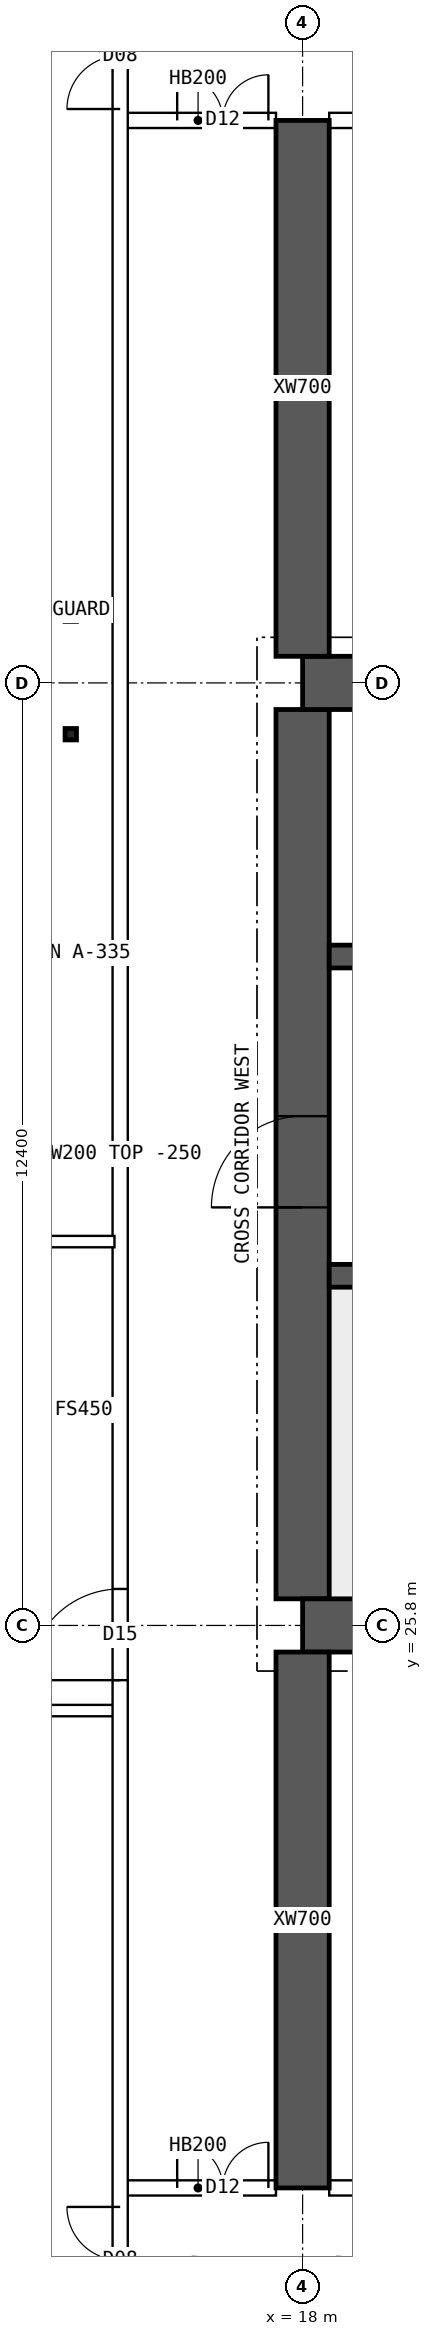
"""IFC4 building model, lengths in metres.
Left out: names, types, materials, properties, quantities, classifications, styles, units other than length and angle.
Written with IfcOpenShell. Run it as: python <this file> out.ifc"""

import sys

from ifc_helpers import new_model, si_unit, direction, frame, frame_2d, origin, origin_2d, place, context, subcontext, project, spatial, polyline, rectangle, hollow_rectangle, outline, extrude, element, fill, save


model = new_model("IFC4")
c1 = context("Model", 3, precision=1e-05, world=origin(), true_north=direction((0.0, 1.0)))
c2 = subcontext(c1, "Body", "Model", "MODEL_VIEW")
j1 = project(units=[si_unit("LENGTHUNIT", "METRE"), si_unit("PLANEANGLEUNIT", "RADIAN")], contexts=[c1])
p1 = place(None, origin())
s1 = spatial("IfcSite", under=j1, at=p1, CompositionType="ELEMENT")
p2 = place(p1, origin())
s2 = spatial("IfcBuilding", under=s1, at=p2, CompositionType="ELEMENT")
p3 = place(p2, frame((0.0, 0.0, 216.55)))
s3 = spatial("IfcBuildingStorey", under=s2, at=p3, CompositionType="ELEMENT", Elevation=216.55)
for number, where, z_axis, x_axis in (
    (1, (18.0, 25.8, 0.0), (0.0, 0.0, 1.0), (1.0, 0.0, 0.0)),
    (2, (18.0, 38.2, 0.0), (0.0, 0.0, 1.0), (1.0, 0.0, 0.0)),
):
    element("IfcWall", number, at=place(p3, frame(where, z_axis=z_axis, x_axis=x_axis)), inside=s3, PredefinedType="SHEAR", context=c2, shape_type="SweptSolid", body=[
        extrude(rectangle(XDim=48.0, YDim=0.7, at=frame_2d((24.0, 0.0))), origin(), (0.0, 0.0, 1.0), 3.75),
    ])
p4 = place(p3, frame((18.0, 26.15, 0.0), z_axis=(0.0, 0.0, 1.0), x_axis=(0.0, 1.0, 0.0)))
e3 = element("IfcWall", 3, at=p4, inside=s3, PredefinedType="SHEAR", context=c2, shape_type="SweptSolid", body=[
    extrude(rectangle(XDim=11.7, YDim=0.7, at=frame_2d((5.85, 0.0))), origin(), (0.0, 0.0, 1.0), 3.75),
])
p5 = place(p4, frame((5.15, 0.0, 0.0)))
e4 = element("IfcOpeningElement", 4, at=p5, cuts=e3, PredefinedType="OPENING", context=c2, shape_type="SweptSolid", body=[
    extrude(rectangle(XDim=1.2, YDim=2.1, at=frame_2d((0.6, 1.05))), frame((0.0, 0.36, 0.0), z_axis=(0.0, -1.0, 0.0), x_axis=(1.0, 0.0, 0.0)), (0.0, 0.0, 1.0), 0.72),
])
p6 = place(p3, frame((18.35, 30.4, 0.0), z_axis=(0.0, 0.0, 1.0), x_axis=(1.0, 0.0, 0.0)))
e5 = element("IfcWall", 5, at=p6, inside=s3, PredefinedType="SHEAR", context=c2, shape_type="SweptSolid", body=[
    extrude(rectangle(XDim=47.3, YDim=0.3, at=frame_2d((23.65, 0.0))), origin(), (0.0, 0.0, 1.0), 3.75),
])
p7 = place(p6, frame((0.4, 0.0, 0.0)))
e6 = element("IfcOpeningElement", 6, at=p7, cuts=e5, PredefinedType="OPENING", context=c2, shape_type="SweptSolid", body=[
    extrude(rectangle(XDim=1.0, YDim=2.1, at=frame_2d((0.5, 1.05))), frame((0.0, 0.16, 0.0), z_axis=(0.0, -1.0, 0.0), x_axis=(1.0, 0.0, 0.0)), (0.0, 0.0, 1.0), 0.32),
])
p8 = place(p6, frame((45.9, 0.0, 0.0)))
e7 = element("IfcOpeningElement", 7, at=p8, cuts=e5, PredefinedType="OPENING", context=c2, shape_type="SweptSolid", body=[
    extrude(rectangle(XDim=1.0, YDim=2.1, at=frame_2d((0.5, 1.05))), frame((0.0, 0.16, 0.0), z_axis=(0.0, -1.0, 0.0), x_axis=(1.0, 0.0, 0.0)), (0.0, 0.0, 1.0), 0.32),
])
p9 = place(p6, frame((8.4, 0.0, 0.0)))
e8 = element("IfcOpeningElement", 8, at=p9, cuts=e5, PredefinedType="OPENING", context=c2, shape_type="SweptSolid", body=[
    extrude(rectangle(XDim=1.1, YDim=2.1, at=frame_2d((0.55, 1.05))), frame((0.0, 0.16, 0.0), z_axis=(0.0, -1.0, 0.0), x_axis=(1.0, 0.0, 0.0)), (0.0, 0.0, 1.0), 0.32),
])
p10 = place(p6, frame((11.0, 0.0, 0.0)))
e9 = element("IfcOpeningElement", 9, at=p10, cuts=e5, PredefinedType="OPENING", context=c2, shape_type="SweptSolid", body=[
    extrude(rectangle(XDim=1.1, YDim=2.1, at=frame_2d((0.55, 1.05))), frame((0.0, 0.16, 0.0), z_axis=(0.0, -1.0, 0.0), x_axis=(1.0, 0.0, 0.0)), (0.0, 0.0, 1.0), 0.32),
])
p11 = place(p6, frame((13.6, 0.0, 0.0)))
e10 = element("IfcOpeningElement", 10, at=p11, cuts=e5, PredefinedType="OPENING", context=c2, shape_type="SweptSolid", body=[
    extrude(rectangle(XDim=1.1, YDim=2.1, at=frame_2d((0.55, 1.05))), frame((0.0, 0.16, 0.0), z_axis=(0.0, -1.0, 0.0), x_axis=(1.0, 0.0, 0.0)), (0.0, 0.0, 1.0), 0.32),
])
p12 = place(p6, frame((16.2, 0.0, 0.0)))
e11 = element("IfcOpeningElement", 11, at=p12, cuts=e5, PredefinedType="OPENING", context=c2, shape_type="SweptSolid", body=[
    extrude(rectangle(XDim=1.1, YDim=2.1, at=frame_2d((0.55, 1.05))), frame((0.0, 0.16, 0.0), z_axis=(0.0, -1.0, 0.0), x_axis=(1.0, 0.0, 0.0)), (0.0, 0.0, 1.0), 0.32),
])
p13 = place(p6, frame((18.975, 0.0, 0.0)))
e12 = element("IfcOpeningElement", 12, at=p13, cuts=e5, PredefinedType="OPENING", context=c2, shape_type="SweptSolid", body=[
    extrude(rectangle(XDim=0.9, YDim=2.1, at=frame_2d((0.45, 1.05))), frame((0.0, 0.16, 0.0), z_axis=(0.0, -1.0, 0.0), x_axis=(1.0, 0.0, 0.0)), (0.0, 0.0, 1.0), 0.32),
])
p14 = place(p6, frame((24.475, 0.0, 0.0)))
e13 = element("IfcOpeningElement", 13, at=p14, cuts=e5, PredefinedType="OPENING", context=c2, shape_type="SweptSolid", body=[
    extrude(rectangle(XDim=0.9, YDim=2.1, at=frame_2d((0.45, 1.05))), frame((0.0, 0.16, 0.0), z_axis=(0.0, -1.0, 0.0), x_axis=(1.0, 0.0, 0.0)), (0.0, 0.0, 1.0), 0.32),
])
p15 = place(p6, frame((30.267, 0.0, 0.0)))
e14 = element("IfcOpeningElement", 14, at=p15, cuts=e5, PredefinedType="OPENING", context=c2, shape_type="SweptSolid", body=[
    extrude(rectangle(XDim=1.1, YDim=2.1, at=frame_2d((0.55, 1.05))), frame((0.0, 0.16, 0.0), z_axis=(0.0, -1.0, 0.0), x_axis=(1.0, 0.0, 0.0)), (0.0, 0.0, 1.0), 0.32),
])
p16 = place(p6, frame((33.8, 0.0, 0.0)))
e15 = element("IfcOpeningElement", 15, at=p16, cuts=e5, PredefinedType="OPENING", context=c2, shape_type="SweptSolid", body=[
    extrude(rectangle(XDim=1.1, YDim=2.1, at=frame_2d((0.55, 1.05))), frame((0.0, 0.16, 0.0), z_axis=(0.0, -1.0, 0.0), x_axis=(1.0, 0.0, 0.0)), (0.0, 0.0, 1.0), 0.32),
])
p17 = place(p6, frame((37.333, 0.0, 0.0)))
e16 = element("IfcOpeningElement", 16, at=p17, cuts=e5, PredefinedType="OPENING", context=c2, shape_type="SweptSolid", body=[
    extrude(rectangle(XDim=1.1, YDim=2.1, at=frame_2d((0.55, 1.05))), frame((0.0, 0.16, 0.0), z_axis=(0.0, -1.0, 0.0), x_axis=(1.0, 0.0, 0.0)), (0.0, 0.0, 1.0), 0.32),
])
p18 = place(p3, frame((18.35, 34.6, 0.0), z_axis=(0.0, 0.0, 1.0), x_axis=(1.0, 0.0, 0.0)))
e17 = element("IfcWall", 17, at=p18, inside=s3, PredefinedType="SHEAR", context=c2, shape_type="SweptSolid", body=[
    extrude(rectangle(XDim=47.3, YDim=0.3, at=frame_2d((23.65, 0.0))), origin(), (0.0, 0.0, 1.0), 3.75),
])
p19 = place(p18, frame((0.9, 0.0, 0.0)))
e18 = element("IfcOpeningElement", 18, at=p19, cuts=e17, PredefinedType="OPENING", context=c2, shape_type="SweptSolid", body=[
    extrude(rectangle(XDim=1.1, YDim=2.1, at=frame_2d((0.55, 1.05))), frame((0.0, 0.16, 0.0), z_axis=(0.0, -1.0, 0.0), x_axis=(1.0, 0.0, 0.0)), (0.0, 0.0, 1.0), 0.32),
])
p20 = place(p18, frame((45.3, 0.0, 0.0)))
e19 = element("IfcOpeningElement", 19, at=p20, cuts=e17, PredefinedType="OPENING", context=c2, shape_type="SweptSolid", body=[
    extrude(rectangle(XDim=1.1, YDim=2.1, at=frame_2d((0.55, 1.05))), frame((0.0, 0.16, 0.0), z_axis=(0.0, -1.0, 0.0), x_axis=(1.0, 0.0, 0.0)), (0.0, 0.0, 1.0), 0.32),
])
p21 = place(p18, frame((4.25, 0.0, 0.0)))
e20 = element("IfcOpeningElement", 20, at=p21, cuts=e17, PredefinedType="OPENING", context=c2, shape_type="SweptSolid", body=[
    extrude(rectangle(XDim=0.9, YDim=2.1, at=frame_2d((0.45, 1.05))), frame((0.0, 0.16, 0.0), z_axis=(0.0, -1.0, 0.0), x_axis=(1.0, 0.0, 0.0)), (0.0, 0.0, 1.0), 0.32),
])
p22 = place(p18, frame((42.15, 0.0, 0.0)))
e21 = element("IfcOpeningElement", 21, at=p22, cuts=e17, PredefinedType="OPENING", context=c2, shape_type="SweptSolid", body=[
    extrude(rectangle(XDim=0.9, YDim=2.1, at=frame_2d((0.45, 1.05))), frame((0.0, 0.16, 0.0), z_axis=(0.0, -1.0, 0.0), x_axis=(1.0, 0.0, 0.0)), (0.0, 0.0, 1.0), 0.32),
])
p23 = place(p18, frame((9.025, 0.0, 0.0)))
e22 = element("IfcOpeningElement", 22, at=p23, cuts=e17, PredefinedType="OPENING", context=c2, shape_type="SweptSolid", body=[
    extrude(rectangle(XDim=0.9, YDim=2.1, at=frame_2d((0.45, 1.05))), frame((0.0, 0.16, 0.0), z_axis=(0.0, -1.0, 0.0), x_axis=(1.0, 0.0, 0.0)), (0.0, 0.0, 1.0), 0.32),
])
p24 = place(p18, frame((12.999, 0.0, 0.0)))
e23 = element("IfcOpeningElement", 23, at=p24, cuts=e17, PredefinedType="OPENING", context=c2, shape_type="SweptSolid", body=[
    extrude(rectangle(XDim=0.9, YDim=2.1, at=frame_2d((0.45, 1.05))), frame((0.0, 0.16, 0.0), z_axis=(0.0, -1.0, 0.0), x_axis=(1.0, 0.0, 0.0)), (0.0, 0.0, 1.0), 0.32),
])
p25 = place(p18, frame((16.646, 0.0, 0.0)))
e24 = element("IfcOpeningElement", 24, at=p25, cuts=e17, PredefinedType="OPENING", context=c2, shape_type="SweptSolid", body=[
    extrude(rectangle(XDim=0.9, YDim=2.1, at=frame_2d((0.45, 1.05))), frame((0.0, 0.16, 0.0), z_axis=(0.0, -1.0, 0.0), x_axis=(1.0, 0.0, 0.0)), (0.0, 0.0, 1.0), 0.32),
])
p26 = place(p18, frame((20.405, 0.0, 0.0)))
e25 = element("IfcOpeningElement", 25, at=p26, cuts=e17, PredefinedType="OPENING", context=c2, shape_type="SweptSolid", body=[
    extrude(rectangle(XDim=0.9, YDim=2.1, at=frame_2d((0.45, 1.05))), frame((0.0, 0.16, 0.0), z_axis=(0.0, -1.0, 0.0), x_axis=(1.0, 0.0, 0.0)), (0.0, 0.0, 1.0), 0.32),
])
p27 = place(p18, frame((24.811, 0.0, 0.0)))
e26 = element("IfcOpeningElement", 26, at=p27, cuts=e17, PredefinedType="OPENING", context=c2, shape_type="SweptSolid", body=[
    extrude(rectangle(XDim=0.9, YDim=2.1, at=frame_2d((0.45, 1.05))), frame((0.0, 0.16, 0.0), z_axis=(0.0, -1.0, 0.0), x_axis=(1.0, 0.0, 0.0)), (0.0, 0.0, 1.0), 0.32),
])
p28 = place(p18, frame((27.608, 0.0, 0.0)))
e27 = element("IfcOpeningElement", 27, at=p28, cuts=e17, PredefinedType="OPENING", context=c2, shape_type="SweptSolid", body=[
    extrude(rectangle(XDim=0.9, YDim=2.1, at=frame_2d((0.45, 1.05))), frame((0.0, 0.16, 0.0), z_axis=(0.0, -1.0, 0.0), x_axis=(1.0, 0.0, 0.0)), (0.0, 0.0, 1.0), 0.32),
])
p29 = place(p18, frame((29.981, 0.0, 0.0)))
e28 = element("IfcOpeningElement", 28, at=p29, cuts=e17, PredefinedType="OPENING", context=c2, shape_type="SweptSolid", body=[
    extrude(rectangle(XDim=0.9, YDim=2.1, at=frame_2d((0.45, 1.05))), frame((0.0, 0.16, 0.0), z_axis=(0.0, -1.0, 0.0), x_axis=(1.0, 0.0, 0.0)), (0.0, 0.0, 1.0), 0.32),
])
p30 = place(p18, frame((33.831, 0.0, 0.0)))
e29 = element("IfcOpeningElement", 29, at=p30, cuts=e17, PredefinedType="OPENING", context=c2, shape_type="SweptSolid", body=[
    extrude(rectangle(XDim=0.9, YDim=2.1, at=frame_2d((0.45, 1.05))), frame((0.0, 0.16, 0.0), z_axis=(0.0, -1.0, 0.0), x_axis=(1.0, 0.0, 0.0)), (0.0, 0.0, 1.0), 0.32),
])
p31 = place(p18, frame((37.579, 0.0, 0.0)))
e30 = element("IfcOpeningElement", 30, at=p31, cuts=e17, PredefinedType="OPENING", context=c2, shape_type="SweptSolid", body=[
    extrude(rectangle(XDim=0.9, YDim=2.1, at=frame_2d((0.45, 1.05))), frame((0.0, 0.16, 0.0), z_axis=(0.0, -1.0, 0.0), x_axis=(1.0, 0.0, 0.0)), (0.0, 0.0, 1.0), 0.32),
])
for number, where, z_axis, x_axis in (
    (31, (18.0, 18.4, 0.0), (0.0, 0.0, 1.0), (0.0, 1.0, 0.0)),
    (32, (18.0, 38.55, 0.0), (0.0, 0.0, 1.0), (0.0, 1.0, 0.0)),
):
    element("IfcWall", number, at=place(p3, frame(where, z_axis=z_axis, x_axis=x_axis)), inside=s3, PredefinedType="SHEAR", context=c2, shape_type="SweptSolid", body=[
        extrude(rectangle(XDim=7.05, YDim=0.7, at=frame_2d((3.525, 0.0))), origin(), (0.0, 0.0, 1.0), 3.75),
    ])
p32 = place(p3, frame((15.6, 18.4, 0.0), z_axis=(0.0, 0.0, 1.0), x_axis=(1.0, 0.0, 0.0)))
e33 = element("IfcWall", 33, at=p32, inside=s3, PredefinedType="SOLIDWALL", context=c2, shape_type="SweptSolid", body=[
    extrude(rectangle(XDim=2.05, YDim=0.2, at=frame_2d((1.025, 0.0))), origin(), (0.0, 0.0, 1.0), 3.5),
])
p33 = place(p32, frame((0.75, 0.0, 0.0)))
e34 = element("IfcOpeningElement", 34, at=p33, cuts=e33, PredefinedType="OPENING", context=c2, shape_type="SweptSolid", body=[
    extrude(rectangle(XDim=1.2, YDim=2.1, at=frame_2d((0.6, 1.05))), frame((0.0, 0.11, 0.0), z_axis=(0.0, -1.0, 0.0), x_axis=(1.0, 0.0, 0.0)), (0.0, 0.0, 1.0), 0.22),
])
p34 = place(p3, frame((18.35, 18.4, 0.0), z_axis=(0.0, 0.0, 1.0), x_axis=(1.0, 0.0, 0.0)))
e35 = element("IfcWall", 35, at=p34, inside=s3, PredefinedType="SOLIDWALL", context=c2, shape_type="SweptSolid", body=[
    extrude(rectangle(XDim=5.3, YDim=0.2, at=frame_2d((2.65, 0.0))), origin(), (0.0, 0.0, 1.0), 3.5),
])
p35 = place(p34, frame((0.35, 0.0, 0.0)))
e36 = element("IfcOpeningElement", 36, at=p35, cuts=e35, PredefinedType="OPENING", context=c2, shape_type="SweptSolid", body=[
    extrude(rectangle(XDim=0.9, YDim=2.1, at=frame_2d((0.45, 1.05))), frame((0.0, 0.11, 0.0), z_axis=(0.0, -1.0, 0.0), x_axis=(1.0, 0.0, 0.0)), (0.0, 0.0, 1.0), 0.22),
])
p36 = place(p34, frame((3.165, 0.0, 0.0)))
e37 = element("IfcOpeningElement", 37, at=p36, cuts=e35, PredefinedType="OPENING", context=c2, shape_type="SweptSolid", body=[
    extrude(rectangle(XDim=0.9, YDim=2.1, at=frame_2d((0.45, 1.05))), frame((0.0, 0.11, 0.0), z_axis=(0.0, -1.0, 0.0), x_axis=(1.0, 0.0, 0.0)), (0.0, 0.0, 1.0), 0.22),
])
p37 = place(p3, frame((15.6, 45.6, 0.0), z_axis=(0.0, 0.0, 1.0), x_axis=(1.0, 0.0, 0.0)))
e38 = element("IfcWall", 38, at=p37, inside=s3, PredefinedType="SOLIDWALL", context=c2, shape_type="SweptSolid", body=[
    extrude(rectangle(XDim=2.05, YDim=0.2, at=frame_2d((1.025, 0.0))), origin(), (0.0, 0.0, 1.0), 3.5),
])
p38 = place(p37, frame((0.75, 0.0, 0.0)))
e39 = element("IfcOpeningElement", 39, at=p38, cuts=e38, PredefinedType="OPENING", context=c2, shape_type="SweptSolid", body=[
    extrude(rectangle(XDim=1.2, YDim=2.1, at=frame_2d((0.6, 1.05))), frame((0.0, 0.11, 0.0), z_axis=(0.0, -1.0, 0.0), x_axis=(1.0, 0.0, 0.0)), (0.0, 0.0, 1.0), 0.22),
])
p39 = place(p3, frame((18.35, 45.6, 0.0), z_axis=(0.0, 0.0, 1.0), x_axis=(1.0, 0.0, 0.0)))
e40 = element("IfcWall", 40, at=p39, inside=s3, PredefinedType="SOLIDWALL", context=c2, shape_type="SweptSolid", body=[
    extrude(rectangle(XDim=5.3, YDim=0.2, at=frame_2d((2.65, 0.0))), origin(), (0.0, 0.0, 1.0), 3.5),
])
p40 = place(p39, frame((0.8, 0.0, 0.0)))
e41 = element("IfcOpeningElement", 41, at=p40, cuts=e40, PredefinedType="OPENING", context=c2, shape_type="SweptSolid", body=[
    extrude(rectangle(XDim=1.0, YDim=2.1, at=frame_2d((0.5, 1.05))), frame((0.0, 0.11, 0.0), z_axis=(0.0, -1.0, 0.0), x_axis=(1.0, 0.0, 0.0)), (0.0, 0.0, 1.0), 0.22),
])
p41 = place(p3, frame((8.705, 30.85, 0.0), z_axis=(0.0, 0.0, 1.0), x_axis=(1.0, 0.0, 0.0)))
e42 = element("IfcWall", 42, at=p41, inside=s3, PredefinedType="PARTITIONING", context=c2, shape_type="SweptSolid", body=[
    extrude(outline(polyline([(0.0, 0.0), (6.82, 0.0), (6.82, 3.5), (3.597, 3.5), (3.595, 3.05), (2.997, 3.05), (2.995, 3.5), (0.0, 3.5), (0.0, 0.0)])), frame((0.0, 0.075, 0.0), z_axis=(0.0, -1.0, 0.0), x_axis=(1.0, 0.0, 0.0)), (0.0, 0.0, 1.0), 0.15),
])
p42 = place(p3, frame((15.6, 11.646, 0.0), z_axis=(0.0, 0.0, 1.0), x_axis=(0.0, 1.0, 0.0)))
e43 = element("IfcWall", 43, at=p42, inside=s3, PredefinedType="SOLIDWALL", context=c2, shape_type="SweptSolid", body=[
    extrude(rectangle(XDim=40.708, YDim=0.2, at=frame_2d((20.354, 0.0))), origin(), (0.0, 0.0, 1.0), 3.5),
])
p43 = place(p42, frame((13.434, 0.0, 0.0)))
e44 = element("IfcOpeningElement", 44, at=p43, cuts=e43, PredefinedType="OPENING", context=c2, shape_type="SweptSolid", body=[
    extrude(rectangle(XDim=1.2, YDim=2.1, at=frame_2d((0.6, 1.05))), frame((0.0, 0.11, 0.0), z_axis=(0.0, -1.0, 0.0), x_axis=(1.0, 0.0, 0.0)), (0.0, 0.0, 1.0), 0.22),
])
p44 = place(p42, frame((5.104, 0.0, 0.0)))
e45 = element("IfcOpeningElement", 45, at=p44, cuts=e43, PredefinedType="OPENING", context=c2, shape_type="SweptSolid", body=[
    extrude(rectangle(XDim=1.4, YDim=2.1, at=frame_2d((0.7, 1.05))), frame((0.0, 0.11, 0.0), z_axis=(0.0, -1.0, 0.0), x_axis=(1.0, 0.0, 0.0)), (0.0, 0.0, 1.0), 0.22),
])
p45 = place(p42, frame((34.104, 0.0, 0.0)))
e46 = element("IfcOpeningElement", 46, at=p45, cuts=e43, PredefinedType="OPENING", context=c2, shape_type="SweptSolid", body=[
    extrude(rectangle(XDim=1.4, YDim=2.1, at=frame_2d((0.7, 1.05))), frame((0.0, 0.11, 0.0), z_axis=(0.0, -1.0, 0.0), x_axis=(1.0, 0.0, 0.0)), (0.0, 0.0, 1.0), 0.22),
])
p46 = place(p3, frame((8.705, 24.68, 0.0), z_axis=(0.0, 0.0, 1.0), x_axis=(1.0, 0.0, 0.0)))
e47 = element("IfcWall", 47, at=p46, inside=s3, PredefinedType="PARTITIONING", context=c2, shape_type="SweptSolid", body=[
    extrude(rectangle(XDim=6.82, YDim=0.15, at=frame_2d((3.41, 0.0))), origin(), (0.0, 0.0, 1.0), 3.5),
])
for number, where, z_axis, x_axis in (
    (48, (14.95, 37.525, 0.0), (0.0, 0.0, 1.0), (1.0, 0.0, 0.0)),
    (49, (14.95, 39.085, 0.0), (0.0, 0.0, 1.0), (1.0, 0.0, 0.0)),
):
    element("IfcColumn", number, at=place(p3, frame(where, z_axis=z_axis, x_axis=x_axis)), inside=s3, PredefinedType="COLUMN", context=c2, shape_type="SweptSolid", body=[
        extrude(hollow_rectangle(XDim=0.15, YDim=0.15, WallThickness=0.008, at=origin_2d()), origin(), (0.0, 0.0, 1.0), 3.5),
    ])
p47 = place(p5, origin())
e50 = element("IfcDoor", 50, at=p47, inside=s3, OperationType="SINGLE_SWING_LEFT", PredefinedType="DOOR", context=c2, shape_type="SweptSolid", body=[
    extrude(rectangle(XDim=1.2, YDim=2.1, at=frame_2d((0.6, 1.05))), frame((0.0, 0.025, 0.0), z_axis=(0.0, -1.0, 0.0), x_axis=(1.0, 0.0, 0.0)), (0.0, 0.0, 1.0), 0.05),
])
fill(e4, e50)
p48 = place(p33, origin())
e51 = element("IfcDoor", 51, at=p48, inside=s3, OperationType="DOUBLE_DOOR_SINGLE_SWING", PredefinedType="DOOR", context=c2, shape_type="SweptSolid", body=[
    extrude(rectangle(XDim=1.2, YDim=2.1, at=frame_2d((0.6, 1.05))), frame((0.0, 0.025, 0.0), z_axis=(0.0, -1.0, 0.0), x_axis=(1.0, 0.0, 0.0)), (0.0, 0.0, 1.0), 0.05),
])
fill(e34, e51)
p49 = place(p38, origin())
e52 = element("IfcDoor", 52, at=p49, inside=s3, OperationType="DOUBLE_DOOR_SINGLE_SWING", PredefinedType="DOOR", context=c2, shape_type="SweptSolid", body=[
    extrude(rectangle(XDim=1.2, YDim=2.1, at=frame_2d((0.6, 1.05))), frame((0.0, 0.025, 0.0), z_axis=(0.0, -1.0, 0.0), x_axis=(1.0, 0.0, 0.0)), (0.0, 0.0, 1.0), 0.05),
])
fill(e39, e52)
p50 = place(p43, origin())
e53 = element("IfcDoor", 53, at=p50, inside=s3, OperationType="SINGLE_SWING_LEFT", PredefinedType="DOOR", context=c2, shape_type="SweptSolid", body=[
    extrude(rectangle(XDim=1.2, YDim=2.1, at=frame_2d((0.6, 1.05))), frame((0.0, 0.025, 0.0), z_axis=(0.0, -1.0, 0.0), x_axis=(1.0, 0.0, 0.0)), (0.0, 0.0, 1.0), 0.05),
])
fill(e44, e53)
p51 = place(p44, origin())
e54 = element("IfcDoor", 54, at=p51, inside=s3, OperationType="DOUBLE_DOOR_SINGLE_SWING", PredefinedType="DOOR", context=c2, shape_type="SweptSolid", body=[
    extrude(rectangle(XDim=1.4, YDim=2.1, at=frame_2d((0.7, 1.05))), frame((0.0, 0.025, 0.0), z_axis=(0.0, -1.0, 0.0), x_axis=(1.0, 0.0, 0.0)), (0.0, 0.0, 1.0), 0.05),
])
fill(e45, e54)
p52 = place(p45, origin())
e55 = element("IfcDoor", 55, at=p52, inside=s3, OperationType="DOUBLE_DOOR_SINGLE_SWING", PredefinedType="DOOR", context=c2, shape_type="SweptSolid", body=[
    extrude(rectangle(XDim=1.4, YDim=2.1, at=frame_2d((0.7, 1.05))), frame((0.0, 0.025, 0.0), z_axis=(0.0, -1.0, 0.0), x_axis=(1.0, 0.0, 0.0)), (0.0, 0.0, 1.0), 0.05),
])
fill(e46, e55)
save(model, sys.argv[1])
